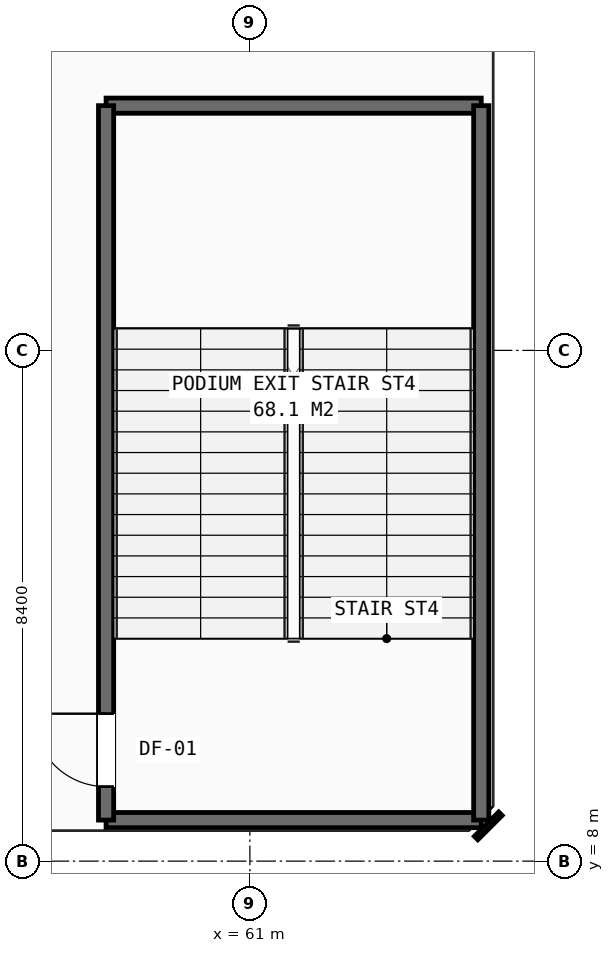
"""IFC4 building model, lengths in metres.
Left out: names, types, materials, properties, quantities, classifications, styles, units other than length and angle.
Written with IfcOpenShell. Run it as: python <this file> out.ifc"""

import sys

from ifc_helpers import new_model, si_unit, direction, frame, frame_2d, origin, place, context, subcontext, project, spatial, rectangle, extrude, element, fill, save


model = new_model("IFC4")
c1 = context("Model", 3, precision=1e-05, world=origin(), true_north=direction((0.0, 1.0)))
c2 = subcontext(c1, "Body", "Model", "MODEL_VIEW")
j1 = project(units=[si_unit("LENGTHUNIT", "METRE"), si_unit("PLANEANGLEUNIT", "RADIAN")], contexts=[c1])
p1 = place(None, origin())
s1 = spatial("IfcSite", under=j1, at=p1, CompositionType="ELEMENT")
p2 = place(p1, origin())
s2 = spatial("IfcBuilding", under=s1, at=p2, CompositionType="ELEMENT")
p3 = place(p2, frame((0.0, 0.0, 5.5)))
s3 = spatial("IfcBuildingStorey", under=s2, at=p3, CompositionType="ELEMENT", Elevation=5.5)
p4 = place(p3, frame((64.72, 8.38, 0.0), z_axis=(0.0, 0.0, 1.0), x_axis=(0.707106781187, 0.707106781187, 0.0)))
e1 = element("IfcWall", 1, at=p4, inside=s3, PredefinedType="STANDARD", context=c2, shape_type="SweptSolid", body=[
    extrude(rectangle(XDim=0.565, YDim=0.08, at=frame_2d((0.283, 0.0))), origin(), (0.0, 0.0, 1.0), 5.18),
])
for number, where, z_axis, x_axis in (
    (2, (58.635, 20.425, 0.0), (0.0, 0.0, 1.0), (1.0, 0.0, 0.0)),
    (3, (58.635, 8.675, 0.0), (0.0, 0.0, 1.0), (1.0, 0.0, 0.0)),
):
    element("IfcWall", number, at=place(p3, frame(where, z_axis=z_axis, x_axis=x_axis)), inside=s3, PredefinedType="SHEAR", context=c2, shape_type="SweptSolid", body=[
        extrude(rectangle(XDim=6.17, YDim=0.25, at=frame_2d((3.085, 0.0))), origin(), (0.0, 0.0, 1.0), 5.18),
    ])
p5 = place(p3, frame((58.635, 8.675, 0.0), z_axis=(0.0, 0.0, 1.0), x_axis=(0.0, 1.0, 0.0)))
e4 = element("IfcWall", 4, at=p5, inside=s3, PredefinedType="SHEAR", context=c2, shape_type="SweptSolid", body=[
    extrude(rectangle(XDim=11.75, YDim=0.25, at=frame_2d((5.875, 0.0))), origin(), (0.0, 0.0, 1.0), 5.18),
])
p6 = place(p5, frame((0.55, 0.0, 0.0)))
e5 = element("IfcOpeningElement", 5, at=p6, cuts=e4, PredefinedType="OPENING", context=c2, shape_type="SweptSolid", body=[
    extrude(rectangle(XDim=1.2, YDim=2.15, at=frame_2d((0.6, 1.075))), frame((0.0, 0.135, 0.0), z_axis=(0.0, -1.0, 0.0), x_axis=(1.0, 0.0, 0.0)), (0.0, 0.0, 1.0), 0.27),
])
p7 = place(p3, frame((64.805, 8.675, 0.0), z_axis=(0.0, 0.0, 1.0), x_axis=(0.0, 1.0, 0.0)))
e6 = element("IfcWall", 6, at=p7, inside=s3, PredefinedType="SHEAR", context=c2, shape_type="SweptSolid", body=[
    extrude(rectangle(XDim=11.75, YDim=0.25, at=frame_2d((5.875, 0.0))), origin(), (0.0, 0.0, 1.0), 5.18),
])
p8 = place(p6, origin())
e7 = element("IfcDoor", 7, at=p8, inside=s3, OperationType="SINGLE_SWING_RIGHT", PredefinedType="DOOR", context=c2, shape_type="SweptSolid", body=[
    extrude(rectangle(XDim=1.2, YDim=2.15, at=frame_2d((0.6, 1.075))), frame((0.0, 0.025, 0.0), z_axis=(0.0, -1.0, 0.0), x_axis=(1.0, 0.0, 0.0)), (0.0, 0.0, 1.0), 0.05),
])
fill(e5, e7)
save(model, sys.argv[1])
